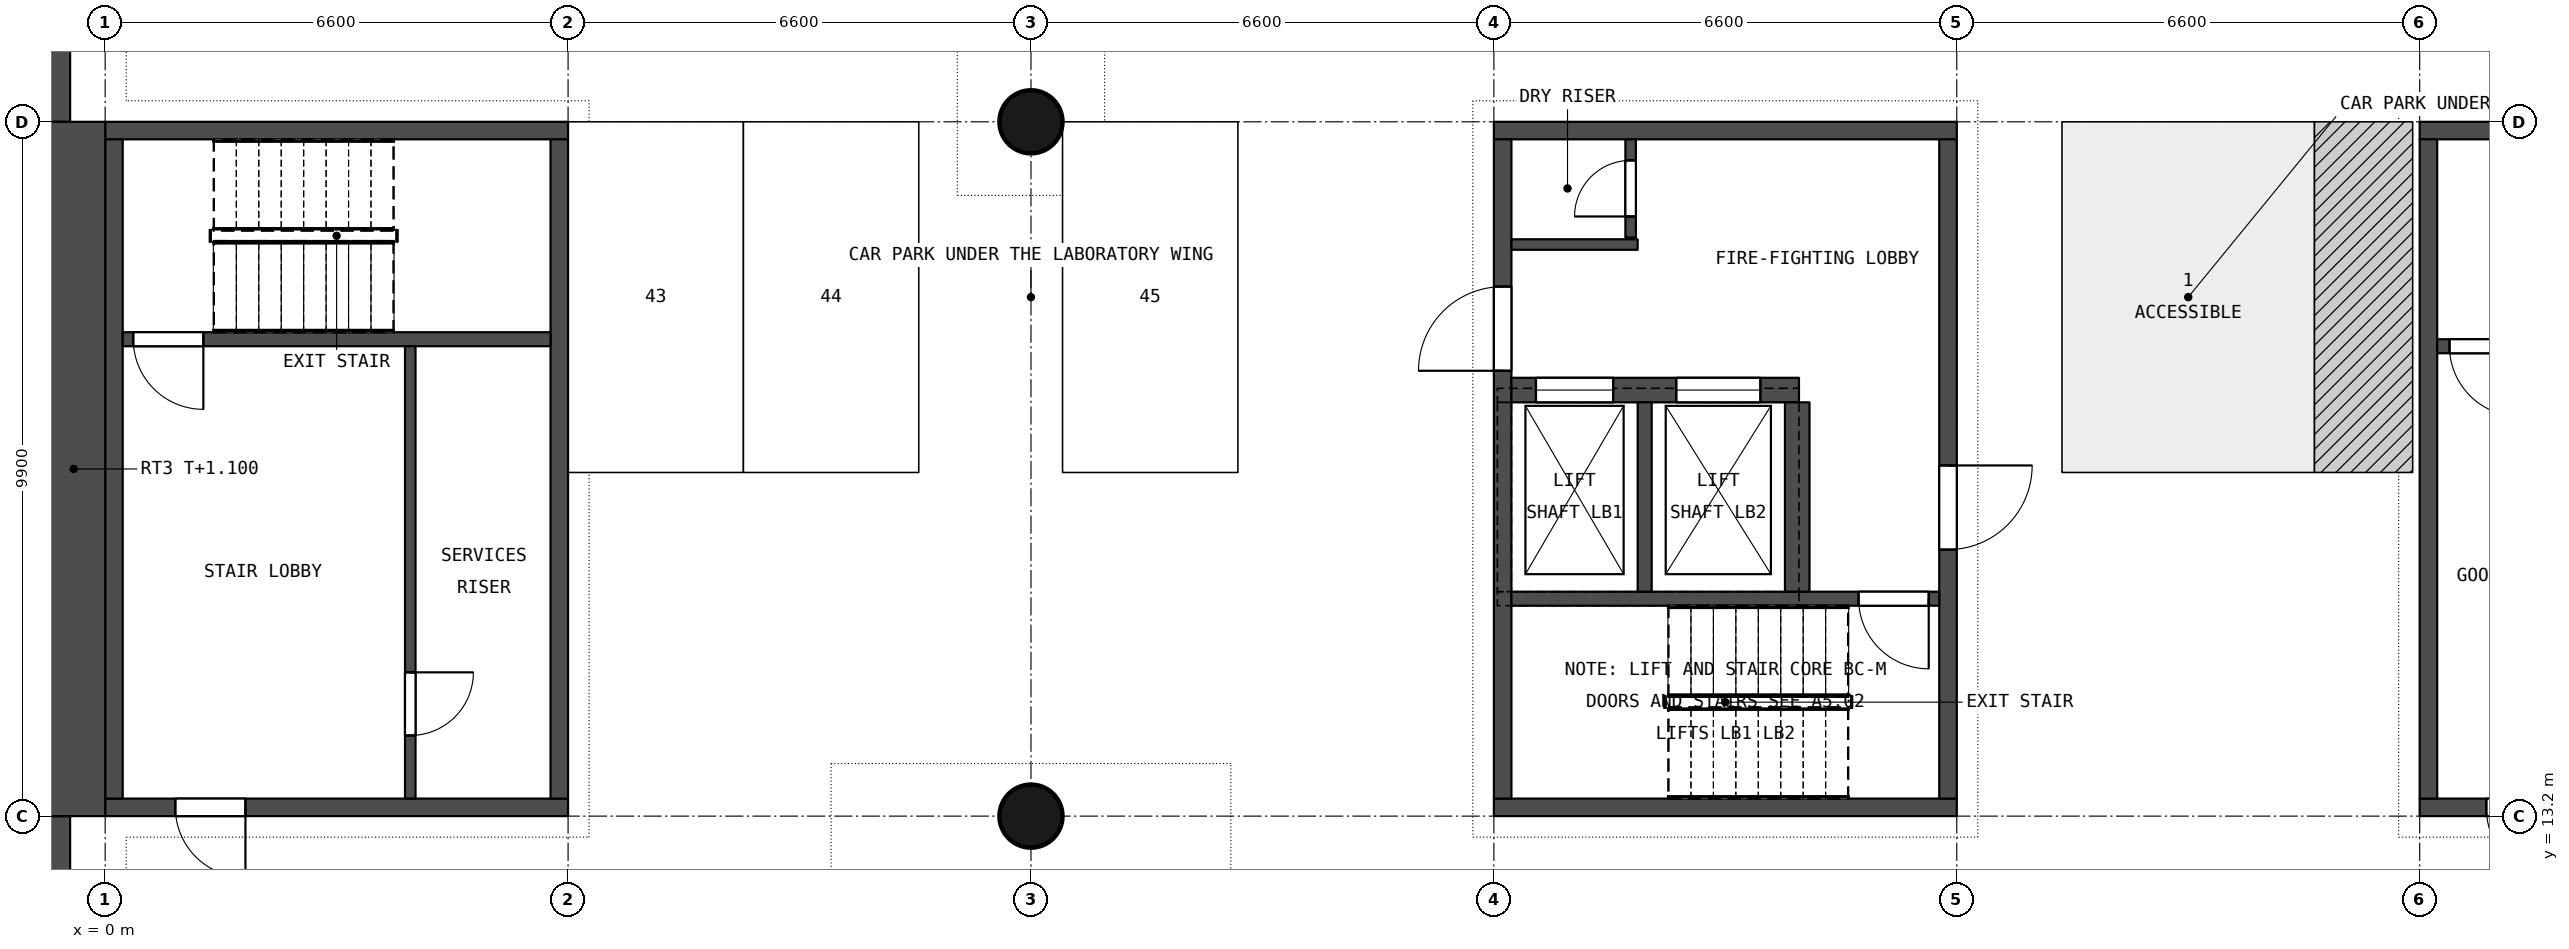
"""IFC4 building model, lengths in metres.
Left out: names, types, materials, properties, quantities, classifications, styles, units other than length and angle.
Written with IfcOpenShell. Run it as: python <this file> out.ifc"""

import sys

from ifc_helpers import new_model, si_unit, direction, frame, frame_2d, origin, origin_2d, place, context, subcontext, project, spatial, rectangle, circle, extrude, element, fill, save


model = new_model("IFC4")
c1 = context("Model", 3, precision=1e-05, world=origin(), true_north=direction((0.0, 1.0)))
c2 = subcontext(c1, "Body", "Model", "MODEL_VIEW")
j1 = project(units=[si_unit("LENGTHUNIT", "METRE"), si_unit("PLANEANGLEUNIT", "RADIAN")], contexts=[c1])
p1 = place(None, origin())
s1 = spatial("IfcSite", under=j1, at=p1, CompositionType="ELEMENT")
p2 = place(p1, origin())
s2 = spatial("IfcBuilding", under=s1, at=p2, CompositionType="ELEMENT")
p3 = place(p2, frame((0.0, 0.0, -5.7)))
s3 = spatial("IfcBuildingStorey", under=s2, at=p3, CompositionType="ELEMENT", Elevation=-5.7)
for number, where, z_axis, x_axis in (
    (1, (13.2, 13.2, 0.0), (0.0, 0.0, 1.0), (1.0, 0.0, 0.0)),
    (2, (13.2, 23.1, 0.0), (0.0, 0.0, 1.0), (1.0, 0.0, 0.0)),
):
    element("IfcColumn", number, at=place(p3, frame(where, z_axis=z_axis, x_axis=x_axis)), inside=s3, PredefinedType="COLUMN", context=c2, shape_type="SweptSolid", body=[
        extrude(circle(Radius=0.45, at=origin_2d()), origin(), (0.0, 0.0, 1.0), 5.7),
    ])
p4 = place(p3, frame((0.0, 13.325, 0.0), z_axis=(0.0, 0.0, 1.0), x_axis=(1.0, 0.0, 0.0)))
e3 = element("IfcWall", 3, at=p4, inside=s3, PredefinedType="SHEAR", context=c2, shape_type="SweptSolid", body=[
    extrude(rectangle(XDim=6.6, YDim=0.25, at=frame_2d((3.3, 0.0))), origin(), (0.0, 0.0, 1.0), 5.4),
])
p5 = place(p4, frame((1.0, 0.0, 0.0)))
e4 = element("IfcOpeningElement", 4, at=p5, cuts=e3, PredefinedType="OPENING", context=c2, shape_type="SweptSolid", body=[
    extrude(rectangle(XDim=1.0, YDim=2.1, at=frame_2d((0.5, 1.05))), frame((0.0, 0.135, 0.0), z_axis=(0.0, -1.0, 0.0), x_axis=(1.0, 0.0, 0.0)), (0.0, 0.0, 1.0), 0.27),
])
p6 = place(p3, frame((0.0, 22.975, 0.0), z_axis=(0.0, 0.0, 1.0), x_axis=(1.0, 0.0, 0.0)))
e5 = element("IfcWall", 5, at=p6, inside=s3, PredefinedType="SHEAR", context=c2, shape_type="SweptSolid", body=[
    extrude(rectangle(XDim=6.6, YDim=0.25, at=frame_2d((3.3, 0.0))), origin(), (0.0, 0.0, 1.0), 5.4),
])
for number, where, z_axis, x_axis in (
    (6, (0.125, 13.45, 0.0), (0.0, 0.0, 1.0), (0.0, 1.0, 0.0)),
    (7, (6.475, 13.45, 0.0), (0.0, 0.0, 1.0), (0.0, 1.0, 0.0)),
):
    element("IfcWall", number, at=place(p3, frame(where, z_axis=z_axis, x_axis=x_axis)), inside=s3, PredefinedType="SHEAR", context=c2, shape_type="SweptSolid", body=[
        extrude(rectangle(XDim=9.4, YDim=0.25, at=frame_2d((4.7, 0.0))), origin(), (0.0, 0.0, 1.0), 5.4),
    ])
p7 = place(p3, frame((0.25, 20.0, 0.0), z_axis=(0.0, 0.0, 1.0), x_axis=(1.0, 0.0, 0.0)))
e8 = element("IfcWall", 8, at=p7, inside=s3, PredefinedType="SHEAR", context=c2, shape_type="SweptSolid", body=[
    extrude(rectangle(XDim=6.1, YDim=0.2, at=frame_2d((3.05, 0.0))), origin(), (0.0, 0.0, 1.0), 5.4),
])
p8 = place(p7, frame((0.15, 0.0, 0.0)))
e9 = element("IfcOpeningElement", 9, at=p8, cuts=e8, PredefinedType="OPENING", context=c2, shape_type="SweptSolid", body=[
    extrude(rectangle(XDim=1.0, YDim=2.1, at=frame_2d((0.5, 1.05))), frame((0.0, 0.11, 0.0), z_axis=(0.0, -1.0, 0.0), x_axis=(1.0, 0.0, 0.0)), (0.0, 0.0, 1.0), 0.22),
])
p9 = place(p3, frame((4.35, 13.45, 0.0), z_axis=(0.0, 0.0, 1.0), x_axis=(0.0, 1.0, 0.0)))
e10 = element("IfcWall", 10, at=p9, inside=s3, PredefinedType="SHEAR", context=c2, shape_type="SweptSolid", body=[
    extrude(rectangle(XDim=6.45, YDim=0.15, at=frame_2d((3.225, 0.0))), origin(), (0.0, 0.0, 1.0), 5.4),
])
p10 = place(p9, frame((0.9, 0.0, 0.0)))
e11 = element("IfcOpeningElement", 11, at=p10, cuts=e10, PredefinedType="OPENING", context=c2, shape_type="SweptSolid", body=[
    extrude(rectangle(XDim=0.9, YDim=2.1, at=frame_2d((0.45, 1.05))), frame((0.0, 0.085, 0.0), z_axis=(0.0, -1.0, 0.0), x_axis=(1.0, 0.0, 0.0)), (0.0, 0.0, 1.0), 0.17),
])
for number, where, z_axis, x_axis in (
    (12, (19.8, 13.325, 0.0), (0.0, 0.0, 1.0), (1.0, 0.0, 0.0)),
    (13, (19.8, 22.975, 0.0), (0.0, 0.0, 1.0), (1.0, 0.0, 0.0)),
):
    element("IfcWall", number, at=place(p3, frame(where, z_axis=z_axis, x_axis=x_axis)), inside=s3, PredefinedType="SHEAR", context=c2, shape_type="SweptSolid", body=[
        extrude(rectangle(XDim=6.6, YDim=0.25, at=frame_2d((3.3, 0.0))), origin(), (0.0, 0.0, 1.0), 5.4),
    ])
p11 = place(p3, frame((19.925, 13.45, 0.0), z_axis=(0.0, 0.0, 1.0), x_axis=(0.0, 1.0, 0.0)))
e14 = element("IfcWall", 14, at=p11, inside=s3, PredefinedType="SHEAR", context=c2, shape_type="SweptSolid", body=[
    extrude(rectangle(XDim=9.4, YDim=0.25, at=frame_2d((4.7, 0.0))), origin(), (0.0, 0.0, 1.0), 5.4),
])
p12 = place(p11, frame((6.1, 0.0, 0.0)))
e15 = element("IfcOpeningElement", 15, at=p12, cuts=e14, PredefinedType="OPENING", context=c2, shape_type="SweptSolid", body=[
    extrude(rectangle(XDim=1.2, YDim=2.1, at=frame_2d((0.6, 1.05))), frame((0.0, 0.135, 0.0), z_axis=(0.0, -1.0, 0.0), x_axis=(1.0, 0.0, 0.0)), (0.0, 0.0, 1.0), 0.27),
])
p13 = place(p3, frame((26.275, 13.45, 0.0), z_axis=(0.0, 0.0, 1.0), x_axis=(0.0, 1.0, 0.0)))
e16 = element("IfcWall", 16, at=p13, inside=s3, PredefinedType="SHEAR", context=c2, shape_type="SweptSolid", body=[
    extrude(rectangle(XDim=9.4, YDim=0.25, at=frame_2d((4.7, 0.0))), origin(), (0.0, 0.0, 1.0), 5.4),
])
p14 = place(p13, frame((3.55, 0.0, 0.0)))
e17 = element("IfcOpeningElement", 17, at=p14, cuts=e16, PredefinedType="OPENING", context=c2, shape_type="SweptSolid", body=[
    extrude(rectangle(XDim=1.2, YDim=2.1, at=frame_2d((0.6, 1.05))), frame((0.0, 0.135, 0.0), z_axis=(0.0, -1.0, 0.0), x_axis=(1.0, 0.0, 0.0)), (0.0, 0.0, 1.0), 0.27),
])
p15 = place(p3, frame((20.05, 16.3, 0.0), z_axis=(0.0, 0.0, 1.0), x_axis=(1.0, 0.0, 0.0)))
e18 = element("IfcWall", 18, at=p15, inside=s3, PredefinedType="SHEAR", context=c2, shape_type="SweptSolid", body=[
    extrude(rectangle(XDim=6.1, YDim=0.2, at=frame_2d((3.05, 0.0))), origin(), (0.0, 0.0, 1.0), 5.4),
])
p16 = place(p15, frame((4.95, 0.0, 0.0)))
e19 = element("IfcOpeningElement", 19, at=p16, cuts=e18, PredefinedType="OPENING", context=c2, shape_type="SweptSolid", body=[
    extrude(rectangle(XDim=1.0, YDim=2.2, at=frame_2d((0.5, 1.1))), frame((0.0, 0.11, 0.0), z_axis=(0.0, -1.0, 0.0), x_axis=(1.0, 0.0, 0.0)), (0.0, 0.0, 1.0), 0.22),
])
p17 = place(p3, frame((20.05, 19.275, 0.0), z_axis=(0.0, 0.0, 1.0), x_axis=(1.0, 0.0, 0.0)))
e20 = element("IfcWall", 20, at=p17, inside=s3, PredefinedType="SHEAR", context=c2, shape_type="SweptSolid", body=[
    extrude(rectangle(XDim=4.1, YDim=0.35, at=frame_2d((2.05, 0.0))), origin(), (0.0, 0.0, 1.0), 5.4),
])
p18 = place(p17, frame((0.35, 0.0, 0.0)))
e21 = element("IfcOpeningElement", 21, at=p18, cuts=e20, PredefinedType="OPENING", context=c2, shape_type="SweptSolid", body=[
    extrude(rectangle(XDim=1.1, YDim=2.2, at=frame_2d((0.55, 1.1))), frame((0.0, 0.185, 0.0), z_axis=(0.0, -1.0, 0.0), x_axis=(1.0, 0.0, 0.0)), (0.0, 0.0, 1.0), 0.37),
])
p19 = place(p17, frame((2.35, 0.0, 0.0)))
e22 = element("IfcOpeningElement", 22, at=p19, cuts=e20, PredefinedType="OPENING", context=c2, shape_type="SweptSolid", body=[
    extrude(rectangle(XDim=1.2, YDim=2.3, at=frame_2d((0.6, 1.15))), frame((0.0, 0.185, 0.0), z_axis=(0.0, -1.0, 0.0), x_axis=(1.0, 0.0, 0.0)), (0.0, 0.0, 1.0), 0.37),
])
p20 = place(p3, frame((21.95, 16.4, 0.0), z_axis=(0.0, 0.0, 1.0), x_axis=(0.0, 1.0, 0.0)))
e23 = element("IfcWall", 23, at=p20, inside=s3, PredefinedType="SHEAR", context=c2, shape_type="SweptSolid", body=[
    extrude(rectangle(XDim=2.7, YDim=0.2, at=frame_2d((1.35, 0.0))), origin(), (0.0, 0.0, 1.0), 5.4),
])
p21 = place(p3, frame((24.125, 16.4, 0.0), z_axis=(0.0, 0.0, 1.0), x_axis=(0.0, 1.0, 0.0)))
e24 = element("IfcWall", 24, at=p21, inside=s3, PredefinedType="SHEAR", context=c2, shape_type="SweptSolid", body=[
    extrude(rectangle(XDim=2.7, YDim=0.35, at=frame_2d((1.35, 0.0))), origin(), (0.0, 0.0, 1.0), 5.4),
])
p22 = place(p3, frame((20.05, 21.35, 0.0), z_axis=(0.0, 0.0, 1.0), x_axis=(1.0, 0.0, 0.0)))
e25 = element("IfcWall", 25, at=p22, inside=s3, PredefinedType="SHEAR", context=c2, shape_type="SweptSolid", body=[
    extrude(rectangle(XDim=1.8, YDim=0.15, at=frame_2d((0.9, 0.0))), origin(), (0.0, 0.0, 1.0), 5.4),
])
p23 = place(p3, frame((21.75, 21.45, 0.0), z_axis=(0.0, 0.0, 1.0), x_axis=(0.0, 1.0, 0.0)))
e26 = element("IfcWall", 26, at=p23, inside=s3, PredefinedType="SHEAR", context=c2, shape_type="SweptSolid", body=[
    extrude(rectangle(XDim=1.4, YDim=0.15, at=frame_2d((0.7, 0.0))), origin(), (0.0, 0.0, 1.0), 5.4),
])
p24 = place(p23, frame((0.3, 0.0, 0.0)))
e27 = element("IfcOpeningElement", 27, at=p24, cuts=e26, PredefinedType="OPENING", context=c2, shape_type="SweptSolid", body=[
    extrude(rectangle(XDim=0.8, YDim=2.0, at=frame_2d((0.4, 1.0))), frame((0.0, 0.085, 0.0), z_axis=(0.0, -1.0, 0.0), x_axis=(1.0, 0.0, 0.0)), (0.0, 0.0, 1.0), 0.17),
])
for number, where, z_axis, x_axis in (
    (28, (19.85, 16.3, -1.2), (0.0, 0.0, 1.0), (1.0, 0.0, 0.0)),
    (29, (19.85, 19.2, -1.2), (0.0, 0.0, 1.0), (1.0, 0.0, 0.0)),
):
    element("IfcWall", number, at=place(p3, frame(where, z_axis=z_axis, x_axis=x_axis)), inside=s3, PredefinedType="SHEAR", context=c2, shape_type="SweptSolid", body=[
        extrude(rectangle(XDim=4.3, YDim=0.2, at=frame_2d((2.15, 0.0))), origin(), (0.0, 0.0, 1.0), 0.6),
    ])
for number, where, z_axis, x_axis in (
    (30, (19.95, 16.4, -1.2), (0.0, 0.0, 1.0), (0.0, 1.0, 0.0)),
    (31, (24.05, 16.4, -1.2), (0.0, 0.0, 1.0), (0.0, 1.0, 0.0)),
):
    element("IfcWall", number, at=place(p3, frame(where, z_axis=z_axis, x_axis=x_axis)), inside=s3, PredefinedType="SHEAR", context=c2, shape_type="SweptSolid", body=[
        extrude(rectangle(XDim=2.7, YDim=0.2, at=frame_2d((1.35, 0.0))), origin(), (0.0, 0.0, 1.0), 0.6),
    ])
p25 = place(p3, frame((33.0, 13.325, 0.0), z_axis=(0.0, 0.0, 1.0), x_axis=(1.0, 0.0, 0.0)))
e32 = element("IfcWall", 32, at=p25, inside=s3, PredefinedType="SHEAR", context=c2, shape_type="SweptSolid", body=[
    extrude(rectangle(XDim=6.6, YDim=0.25, at=frame_2d((3.3, 0.0))), origin(), (0.0, 0.0, 1.0), 5.4),
])
p26 = place(p25, frame((0.95, 0.0, 0.0)))
e33 = element("IfcOpeningElement", 33, at=p26, cuts=e32, PredefinedType="OPENING", context=c2, shape_type="SweptSolid", body=[
    extrude(rectangle(XDim=1.1, YDim=2.1, at=frame_2d((0.55, 1.05))), frame((0.0, 0.135, 0.0), z_axis=(0.0, -1.0, 0.0), x_axis=(1.0, 0.0, 0.0)), (0.0, 0.0, 1.0), 0.27),
])
p27 = place(p3, frame((33.0, 22.975, 0.0), z_axis=(0.0, 0.0, 1.0), x_axis=(1.0, 0.0, 0.0)))
e34 = element("IfcWall", 34, at=p27, inside=s3, PredefinedType="SHEAR", context=c2, shape_type="SweptSolid", body=[
    extrude(rectangle(XDim=6.6, YDim=0.25, at=frame_2d((3.3, 0.0))), origin(), (0.0, 0.0, 1.0), 5.4),
])
p28 = place(p3, frame((33.125, 13.45, 0.0), z_axis=(0.0, 0.0, 1.0), x_axis=(0.0, 1.0, 0.0)))
e35 = element("IfcWall", 35, at=p28, inside=s3, PredefinedType="SHEAR", context=c2, shape_type="SweptSolid", body=[
    extrude(rectangle(XDim=9.4, YDim=0.25, at=frame_2d((4.7, 0.0))), origin(), (0.0, 0.0, 1.0), 5.4),
])
p29 = place(p3, frame((33.25, 19.9, 0.0), z_axis=(0.0, 0.0, 1.0), x_axis=(1.0, 0.0, 0.0)))
e36 = element("IfcWall", 36, at=p29, inside=s3, PredefinedType="SHEAR", context=c2, shape_type="SweptSolid", body=[
    extrude(rectangle(XDim=6.1, YDim=0.2, at=frame_2d((3.05, 0.0))), origin(), (0.0, 0.0, 1.0), 5.4),
])
p30 = place(p29, frame((0.175, 0.0, 0.0)))
e37 = element("IfcOpeningElement", 37, at=p30, cuts=e36, PredefinedType="OPENING", context=c2, shape_type="SweptSolid", body=[
    extrude(rectangle(XDim=1.0, YDim=2.1, at=frame_2d((0.5, 1.05))), frame((0.0, 0.11, 0.0), z_axis=(0.0, -1.0, 0.0), x_axis=(1.0, 0.0, 0.0)), (0.0, 0.0, 1.0), 0.22),
])
p31 = place(p3, frame((-0.7, 3.3, 0.0), z_axis=(0.0, 0.0, 1.0), x_axis=(0.0, 1.0, 0.0)))
e38 = element("IfcWall", 38, at=p31, inside=s3, PredefinedType="SOLIDWALL", context=c2, shape_type="SweptSolid", body=[
    extrude(rectangle(XDim=9.9, YDim=0.4, at=frame_2d((4.95, 0.0))), origin(), (0.0, 0.0, 1.0), 6.8),
])
p32 = place(p3, frame((-0.7, 23.1, 0.0), z_axis=(0.0, 0.0, 1.0), x_axis=(0.0, 1.0, 0.0)))
e39 = element("IfcWall", 39, at=p32, inside=s3, PredefinedType="SOLIDWALL", context=c2, shape_type="SweptSolid", body=[
    extrude(rectangle(XDim=20.3, YDim=0.4, at=frame_2d((10.15, 0.0))), origin(), (0.0, 0.0, 1.0), 6.8),
])
p33 = place(p3, frame((-0.45, 13.2, 0.0), z_axis=(0.0, 0.0, 1.0), x_axis=(0.0, 1.0, 0.0)))
e40 = element("IfcWall", 40, at=p33, inside=s3, PredefinedType="SOLIDWALL", context=c2, shape_type="SweptSolid", body=[
    extrude(rectangle(XDim=9.9, YDim=0.9, at=frame_2d((4.95, 0.0))), origin(), (0.0, 0.0, 1.0), 6.8),
])
p34 = place(p10, origin())
e41 = element("IfcDoor", 41, at=p34, inside=s3, OperationType="SINGLE_SWING_RIGHT", PredefinedType="DOOR", context=c2, shape_type="SweptSolid", body=[
    extrude(rectangle(XDim=0.9, YDim=2.1, at=frame_2d((0.45, 1.05))), frame((0.0, 0.025, 0.0), z_axis=(0.0, -1.0, 0.0), x_axis=(1.0, 0.0, 0.0)), (0.0, 0.0, 1.0), 0.05),
])
fill(e11, e41)
p35 = place(p5, origin())
e42 = element("IfcDoor", 42, at=p35, inside=s3, OperationType="SINGLE_SWING_RIGHT", PredefinedType="DOOR", context=c2, shape_type="SweptSolid", body=[
    extrude(rectangle(XDim=1.0, YDim=2.1, at=frame_2d((0.5, 1.05))), frame((0.0, 0.025, 0.0), z_axis=(0.0, -1.0, 0.0), x_axis=(1.0, 0.0, 0.0)), (0.0, 0.0, 1.0), 0.05),
])
fill(e4, e42)
p36 = place(p8, origin())
e43 = element("IfcDoor", 43, at=p36, inside=s3, OperationType="SINGLE_SWING_RIGHT", PredefinedType="DOOR", context=c2, shape_type="SweptSolid", body=[
    extrude(rectangle(XDim=1.0, YDim=2.1, at=frame_2d((0.5, 1.05))), frame((0.0, 0.025, 0.0), z_axis=(0.0, -1.0, 0.0), x_axis=(1.0, 0.0, 0.0)), (0.0, 0.0, 1.0), 0.05),
])
fill(e9, e43)
p37 = place(p14, origin())
e44 = element("IfcDoor", 44, at=p37, inside=s3, OperationType="SINGLE_SWING_RIGHT", PredefinedType="DOOR", context=c2, shape_type="SweptSolid", body=[
    extrude(rectangle(XDim=1.2, YDim=2.1, at=frame_2d((0.6, 1.05))), frame((0.0, 0.025, 0.0), z_axis=(0.0, -1.0, 0.0), x_axis=(1.0, 0.0, 0.0)), (0.0, 0.0, 1.0), 0.05),
])
fill(e17, e44)
p38 = place(p12, origin())
e45 = element("IfcDoor", 45, at=p38, inside=s3, OperationType="SINGLE_SWING_LEFT", PredefinedType="DOOR", context=c2, shape_type="SweptSolid", body=[
    extrude(rectangle(XDim=1.2, YDim=2.1, at=frame_2d((0.6, 1.05))), frame((0.0, 0.025, 0.0), z_axis=(0.0, -1.0, 0.0), x_axis=(1.0, 0.0, 0.0)), (0.0, 0.0, 1.0), 0.05),
])
fill(e15, e45)
p39 = place(p16, origin())
e46 = element("IfcDoor", 46, at=p39, inside=s3, OperationType="SINGLE_SWING_RIGHT", PredefinedType="DOOR", context=c2, shape_type="SweptSolid", body=[
    extrude(rectangle(XDim=1.0, YDim=2.2, at=frame_2d((0.5, 1.1))), frame((0.0, 0.025, 0.0), z_axis=(0.0, -1.0, 0.0), x_axis=(1.0, 0.0, 0.0)), (0.0, 0.0, 1.0), 0.05),
])
fill(e19, e46)
p40 = place(p24, origin())
e47 = element("IfcDoor", 47, at=p40, inside=s3, OperationType="SINGLE_SWING_LEFT", PredefinedType="DOOR", context=c2, shape_type="SweptSolid", body=[
    extrude(rectangle(XDim=0.8, YDim=2.0, at=frame_2d((0.4, 1.0))), frame((0.0, 0.025, 0.0), z_axis=(0.0, -1.0, 0.0), x_axis=(1.0, 0.0, 0.0)), (0.0, 0.0, 1.0), 0.05),
])
fill(e27, e47)
p41 = place(p18, origin())
e48 = element("IfcDoor", 48, at=p41, inside=s3, OperationType="DOUBLE_DOOR_SLIDING", PredefinedType="NOTDEFINED", context=c2, shape_type="SweptSolid", body=[
    extrude(rectangle(XDim=1.1, YDim=2.2, at=frame_2d((0.55, 1.1))), frame((0.0, 0.025, 0.0), z_axis=(0.0, -1.0, 0.0), x_axis=(1.0, 0.0, 0.0)), (0.0, 0.0, 1.0), 0.05),
])
fill(e21, e48)
p42 = place(p19, origin())
e49 = element("IfcDoor", 49, at=p42, inside=s3, OperationType="DOUBLE_DOOR_SLIDING", PredefinedType="NOTDEFINED", context=c2, shape_type="SweptSolid", body=[
    extrude(rectangle(XDim=1.2, YDim=2.3, at=frame_2d((0.6, 1.15))), frame((0.0, 0.025, 0.0), z_axis=(0.0, -1.0, 0.0), x_axis=(1.0, 0.0, 0.0)), (0.0, 0.0, 1.0), 0.05),
])
fill(e22, e49)
p43 = place(p26, origin())
e50 = element("IfcDoor", 50, at=p43, inside=s3, OperationType="SINGLE_SWING_RIGHT", PredefinedType="DOOR", context=c2, shape_type="SweptSolid", body=[
    extrude(rectangle(XDim=1.1, YDim=2.1, at=frame_2d((0.55, 1.05))), frame((0.0, 0.025, 0.0), z_axis=(0.0, -1.0, 0.0), x_axis=(1.0, 0.0, 0.0)), (0.0, 0.0, 1.0), 0.05),
])
fill(e33, e50)
p44 = place(p30, origin())
e51 = element("IfcDoor", 51, at=p44, inside=s3, OperationType="SINGLE_SWING_RIGHT", PredefinedType="DOOR", context=c2, shape_type="SweptSolid", body=[
    extrude(rectangle(XDim=1.0, YDim=2.1, at=frame_2d((0.5, 1.05))), frame((0.0, 0.025, 0.0), z_axis=(0.0, -1.0, 0.0), x_axis=(1.0, 0.0, 0.0)), (0.0, 0.0, 1.0), 0.05),
])
fill(e37, e51)
save(model, sys.argv[1])
